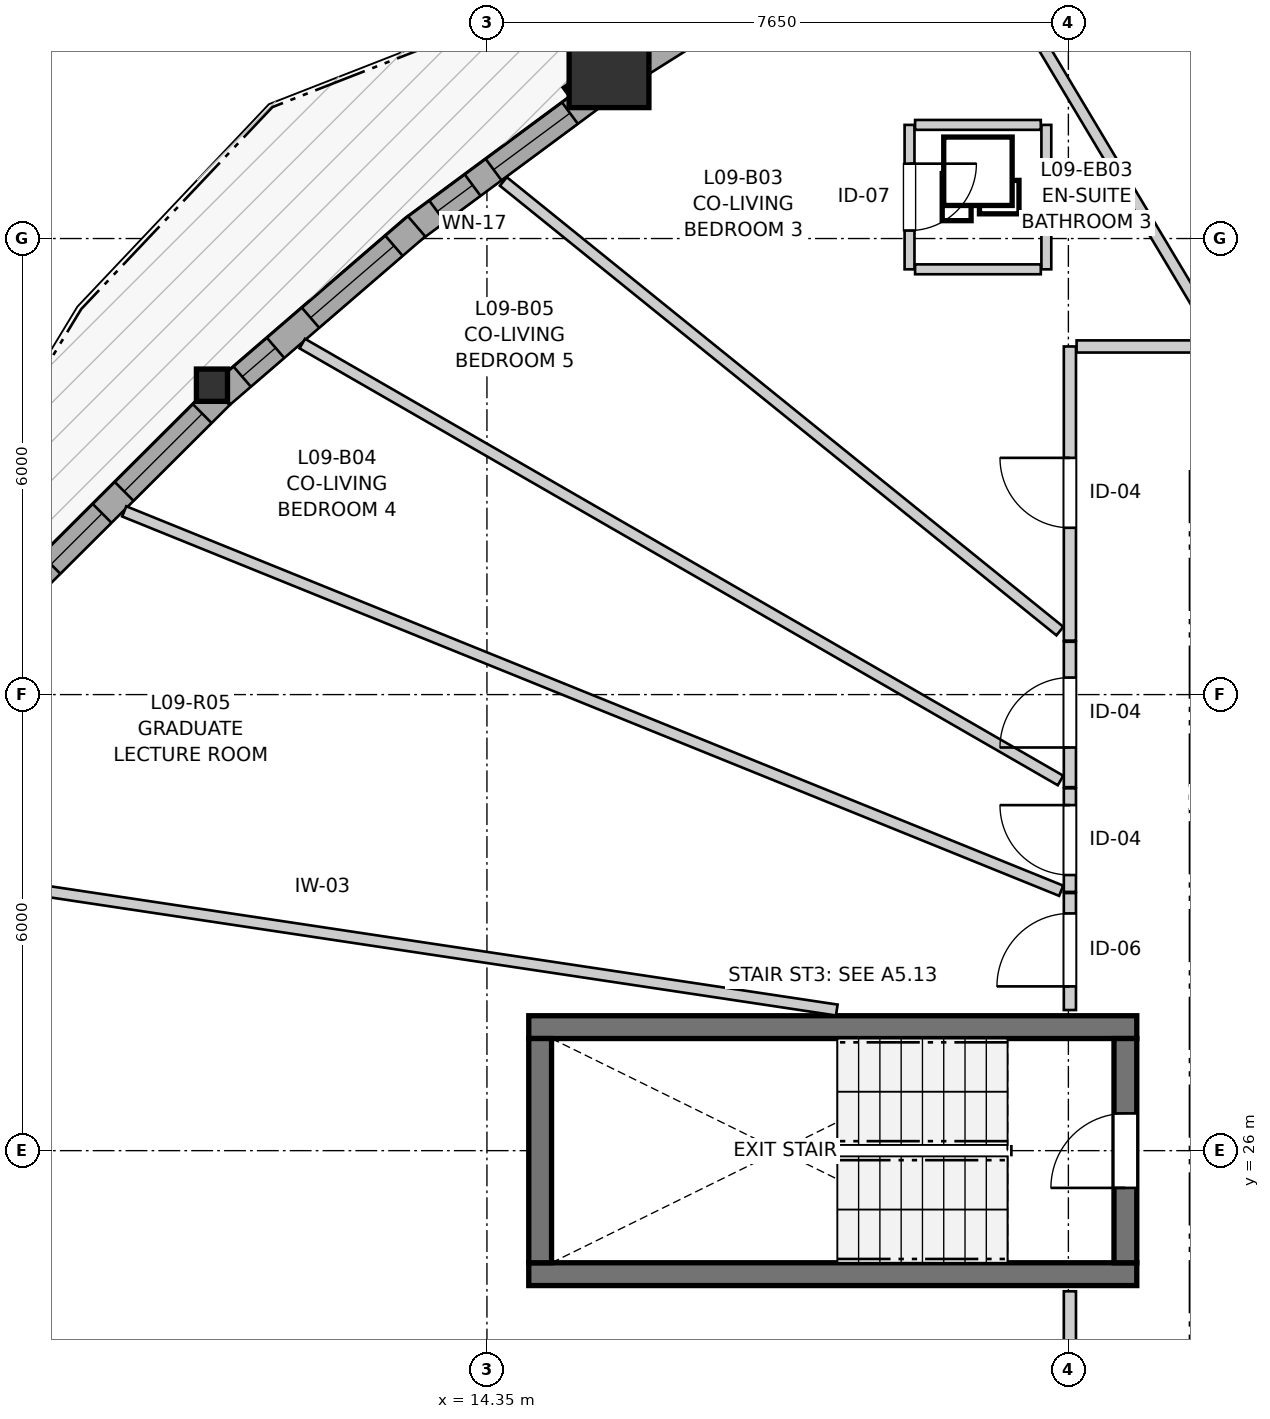
"""IFC4 building model, lengths in metres.
Left out: names, types, materials, properties, quantities, classifications, styles, units other than length and angle.
Written with IfcOpenShell. Run it as: python <this file> out.ifc"""

import sys

from ifc_helpers import new_model, si_unit, direction, frame, frame_2d, origin, origin_2d, place, context, subcontext, project, spatial, rectangle, i_section, extrude, source, transform, mapped, element, fill, save


model = new_model("IFC4")
c1 = context("Model", 3, precision=1e-05, world=origin(), true_north=direction((0.0, 1.0)))
c2 = subcontext(c1, "Body", "Model", "MODEL_VIEW")
j1 = project(units=[si_unit("LENGTHUNIT", "METRE"), si_unit("PLANEANGLEUNIT", "RADIAN")], contexts=[c1])
p1 = place(None, origin())
s1 = spatial("IfcSite", under=j1, at=p1, CompositionType="ELEMENT")
p2 = place(p1, origin())
s2 = spatial("IfcBuilding", under=s1, at=p2, CompositionType="ELEMENT")
p3 = place(p2, frame((0.0, 0.0, 33.4)))
s3 = spatial("IfcBuildingStorey", under=s2, at=p3, CompositionType="ELEMENT", Elevation=33.4)
for number, where, z_axis, x_axis in (
    (1, (14.9, 24.375, 0.0), (0.0, 0.0, 1.0), (1.0, 0.0, 0.0)),
    (2, (22.9, 27.625, 0.0), (0.0, 0.0, 1.0), (-1.0, 0.0, 0.0)),
):
    element("IfcWall", number, at=place(p3, frame(where, z_axis=z_axis, x_axis=x_axis)), inside=s3, PredefinedType="SHEAR", context=c2, shape_type="SweptSolid", body=[
        extrude(rectangle(XDim=8.0, YDim=0.3, at=frame_2d((4.0, 0.0))), origin(), (0.0, 0.0, 1.0), 2.94),
    ])
p4 = place(p3, frame((15.05, 27.475, 0.0), z_axis=(0.0, 0.0, 1.0), x_axis=(0.0, -1.0, 0.0)))
e3 = element("IfcWall", 3, at=p4, inside=s3, PredefinedType="SHEAR", context=c2, shape_type="SweptSolid", body=[
    extrude(rectangle(XDim=2.95, YDim=0.3, at=frame_2d((1.475, 0.0))), origin(), (0.0, 0.0, 1.0), 2.94),
])
p5 = place(p3, frame((22.75, 24.525, 0.0), z_axis=(0.0, 0.0, 1.0), x_axis=(0.0, 1.0, 0.0)))
e4 = element("IfcWall", 4, at=p5, inside=s3, PredefinedType="SHEAR", context=c2, shape_type="SweptSolid", body=[
    extrude(rectangle(XDim=2.95, YDim=0.3, at=frame_2d((1.475, 0.0))), origin(), (0.0, 0.0, 1.0), 2.94),
])
p6 = place(p5, frame((0.985, 0.0, 0.0)))
e5 = element("IfcOpeningElement", 5, at=p6, cuts=e4, PredefinedType="OPENING", context=c2, shape_type="SweptSolid", body=[
    extrude(rectangle(XDim=0.98, YDim=2.15, at=frame_2d((0.49, 1.075))), frame((0.0, 0.16, 0.0), z_axis=(0.0, -1.0, 0.0), x_axis=(1.0, 0.0, 0.0)), (0.0, 0.0, 1.0), 0.32),
])
m1 = source(origin(), c2, "Body", "SweptSolid", [
    extrude(rectangle(XDim=1.05, YDim=1.05, at=origin_2d()), origin(), (0.0, 0.0, 1.0), 2.94),
])
p7 = place(p3, frame((15.956, 40.247, 0.0), z_axis=(0.0, 0.0, 1.0), x_axis=(1.0, 0.0, 0.0)))
e6 = element("IfcColumn", 6, at=p7, inside=s3, PredefinedType="COLUMN", context=c2, shape_type="MappedRepresentation", body=[
    mapped(m1, transform((0.0, 0.0, 0.0), x_axis=(1.0, 0.0, 0.0), y_axis=(0.0, 1.0, 0.0), z_axis=(0.0, 0.0, 1.0), scale=1.0)),
])
m2 = source(origin(), c2, "Body", "SweptSolid", [
    extrude(i_section(OverallWidth=0.409, OverallDepth=0.425, WebThickness=0.03, FlangeThickness=0.048, FilletRadius=0.015, at=origin_2d()), origin(), (0.0, 0.0, 1.0), 2.94),
])
p8 = place(p3, frame((10.732, 36.07, 0.0), z_axis=(0.0, 0.0, 1.0), x_axis=(1.0, 0.0, 0.0)))
e7 = element("IfcColumn", 7, at=p8, inside=s3, PredefinedType="PILASTER", context=c2, shape_type="MappedRepresentation", body=[
    mapped(m2, transform((0.0, 0.0, 0.0), x_axis=(1.0, 0.0, 0.0), y_axis=(0.0, 1.0, 0.0), z_axis=(0.0, 0.0, 1.0), scale=1.0)),
])
p9 = place(p3, frame((18.882, 41.882, 0.0), z_axis=(0.0, 0.0, 1.0), x_axis=(-0.846428134238, -0.53250297048, 0.0)))
e8 = element("IfcWall", 8, at=p9, inside=s3, PredefinedType="SOLIDWALL", context=c2, shape_type="SweptSolid", body=[
    extrude(rectangle(XDim=3.047, YDim=0.35, at=frame_2d((1.523, 0.0))), origin(), (0.0, 0.0, 1.0), 2.42),
])
p10 = place(p9, frame((0.803, 0.0, 0.82)))
e9 = element("IfcOpeningElement", 9, at=p10, cuts=e8, PredefinedType="OPENING", context=c2, shape_type="SweptSolid", body=[
    extrude(rectangle(XDim=1.45, YDim=1.25, at=frame_2d((0.725, 0.625))), frame((0.0, 0.185, 0.0), z_axis=(0.0, -1.0, 0.0), x_axis=(1.0, 0.0, 0.0)), (0.0, 0.0, 1.0), 0.37),
])
p11 = place(p3, frame((15.819, 39.928, 0.0), z_axis=(0.0, 0.0, 1.0), x_axis=(-0.803825144674, -0.594865645999, 0.0)))
e10 = element("IfcWall", 10, at=p11, inside=s3, PredefinedType="SOLIDWALL", context=c2, shape_type="SweptSolid", body=[
    extrude(rectangle(XDim=3.066, YDim=0.35, at=frame_2d((1.533, 0.0))), origin(), (0.0, 0.0, 1.0), 2.42),
])
p12 = place(p11, frame((0.469, 0.0, 0.82)))
e11 = element("IfcOpeningElement", 11, at=p12, cuts=e10, PredefinedType="OPENING", context=c2, shape_type="SweptSolid", body=[
    extrude(rectangle(XDim=1.25, YDim=1.35, at=frame_2d((0.625, 0.675))), frame((0.0, 0.185, 0.0), z_axis=(0.0, -1.0, 0.0), x_axis=(1.0, 0.0, 0.0)), (0.0, 0.0, 1.0), 0.37),
])
p13 = place(p11, frame((2.062, 0.0, 0.82)))
e12 = element("IfcOpeningElement", 12, at=p13, cuts=e10, PredefinedType="OPENING", context=c2, shape_type="SweptSolid", body=[
    extrude(rectangle(XDim=0.58, YDim=1.35, at=frame_2d((0.29, 0.675))), frame((0.0, 0.185, 0.0), z_axis=(0.0, -1.0, 0.0), x_axis=(1.0, 0.0, 0.0)), (0.0, 0.0, 1.0), 0.37),
])
p14 = place(p3, frame((13.424, 38.16, 0.0), z_axis=(0.0, 0.0, 1.0), x_axis=(-0.757512075852, -0.652821150805, 0.0)))
e13 = element("IfcWall", 13, at=p14, inside=s3, PredefinedType="SOLIDWALL", context=c2, shape_type="SweptSolid", body=[
    extrude(rectangle(XDim=3.384, YDim=0.35, at=frame_2d((1.692, 0.0))), origin(), (0.0, 0.0, 1.0), 2.42),
])
p15 = place(p14, frame((0.392, 0.0, 0.82)))
e14 = element("IfcOpeningElement", 14, at=p15, cuts=e13, PredefinedType="OPENING", context=c2, shape_type="SweptSolid", body=[
    extrude(rectangle(XDim=1.45, YDim=1.25, at=frame_2d((0.725, 0.625))), frame((0.0, 0.185, 0.0), z_axis=(0.0, -1.0, 0.0), x_axis=(1.0, 0.0, 0.0)), (0.0, 0.0, 1.0), 0.37),
])
p16 = place(p14, frame((2.449, 0.0, 0.82)))
e15 = element("IfcOpeningElement", 15, at=p16, cuts=e13, PredefinedType="OPENING", context=c2, shape_type="SweptSolid", body=[
    extrude(rectangle(XDim=0.58, YDim=1.35, at=frame_2d((0.29, 0.675))), frame((0.0, 0.185, 0.0), z_axis=(0.0, -1.0, 0.0), x_axis=(1.0, 0.0, 0.0)), (0.0, 0.0, 1.0), 0.37),
])
p17 = place(p3, frame((10.841, 35.932, 0.0), z_axis=(0.0, 0.0, 1.0), x_axis=(-0.708383272101, -0.70582798174, 0.0)))
e16 = element("IfcWall", 16, at=p17, inside=s3, PredefinedType="SOLIDWALL", context=c2, shape_type="SweptSolid", body=[
    extrude(rectangle(XDim=3.439, YDim=0.35, at=frame_2d((1.72, 0.0))), origin(), (0.0, 0.0, 1.0), 2.42),
])
p18 = place(p17, frame((0.334, 0.0, 0.82)))
e17 = element("IfcOpeningElement", 17, at=p18, cuts=e16, PredefinedType="OPENING", context=c2, shape_type="SweptSolid", body=[
    extrude(rectangle(XDim=1.45, YDim=1.25, at=frame_2d((0.725, 0.625))), frame((0.0, 0.185, 0.0), z_axis=(0.0, -1.0, 0.0), x_axis=(1.0, 0.0, 0.0)), (0.0, 0.0, 1.0), 0.37),
])
p19 = place(p17, frame((2.194, 0.0, 0.82)))
e18 = element("IfcOpeningElement", 18, at=p19, cuts=e16, PredefinedType="OPENING", context=c2, shape_type="SweptSolid", body=[
    extrude(rectangle(XDim=0.95, YDim=1.35, at=frame_2d((0.475, 0.675))), frame((0.0, 0.185, 0.0), z_axis=(0.0, -1.0, 0.0), x_axis=(1.0, 0.0, 0.0)), (0.0, 0.0, 1.0), 0.37),
])
p20 = place(p3, frame((22.02, 16.883, 0.0), z_axis=(0.0, 0.0, 1.0), x_axis=(0.0, 1.0, 0.0)))
e19 = element("IfcWall", 19, at=p20, inside=s3, PredefinedType="PARTITIONING", context=c2, shape_type="SweptSolid", body=[
    extrude(rectangle(XDim=7.267, YDim=0.16, at=frame_2d((3.633, 0.0))), origin(), (0.0, 0.0, 1.0), 2.94),
])
p21 = place(p20, frame((2.845, 0.0, 0.0)))
e20 = element("IfcOpeningElement", 20, at=p21, cuts=e19, PredefinedType="OPENING", context=c2, shape_type="SweptSolid", body=[
    extrude(rectangle(XDim=1.3, YDim=2.1, at=frame_2d((0.65, 1.05))), frame((0.0, 0.09, 0.0), z_axis=(0.0, -1.0, 0.0), x_axis=(1.0, 0.0, 0.0)), (0.0, 0.0, 1.0), 0.18),
])
p22 = place(p3, frame((22.02, 32.71, 0.0), z_axis=(0.0, 0.0, 1.0), x_axis=(0.0, 1.0, 0.0)))
e21 = element("IfcWall", 21, at=p22, inside=s3, PredefinedType="PARTITIONING", context=c2, shape_type="SweptSolid", body=[
    extrude(rectangle(XDim=3.87, YDim=0.16, at=frame_2d((1.935, 0.0))), origin(), (0.0, 0.0, 1.0), 2.94),
])
p23 = place(p22, frame((1.485, 0.0, 0.0)))
e22 = element("IfcOpeningElement", 22, at=p23, cuts=e21, PredefinedType="OPENING", context=c2, shape_type="SweptSolid", body=[
    extrude(rectangle(XDim=0.92, YDim=2.1, at=frame_2d((0.46, 1.05))), frame((0.0, 0.09, 0.0), z_axis=(0.0, -1.0, 0.0), x_axis=(1.0, 0.0, 0.0)), (0.0, 0.0, 1.0), 0.18),
])
p24 = place(p3, frame((22.02, 30.782, 0.0), z_axis=(0.0, 0.0, 1.0), x_axis=(0.0, 1.0, 0.0)))
e23 = element("IfcWall", 23, at=p24, inside=s3, PredefinedType="PARTITIONING", context=c2, shape_type="SweptSolid", body=[
    extrude(rectangle(XDim=1.913, YDim=0.16, at=frame_2d((0.957, 0.0))), origin(), (0.0, 0.0, 1.0), 2.94),
])
p25 = place(p24, frame((0.522, 0.0, 0.0)))
e24 = element("IfcOpeningElement", 24, at=p25, cuts=e23, PredefinedType="OPENING", context=c2, shape_type="SweptSolid", body=[
    extrude(rectangle(XDim=0.92, YDim=2.1, at=frame_2d((0.46, 1.05))), frame((0.0, 0.09, 0.0), z_axis=(0.0, -1.0, 0.0), x_axis=(1.0, 0.0, 0.0)), (0.0, 0.0, 1.0), 0.18),
])
p26 = place(p3, frame((19.91, 39.495, 0.0), z_axis=(0.0, 0.0, 1.0), x_axis=(0.0, -1.0, 0.0)))
e25 = element("IfcWall", 25, at=p26, inside=s3, PredefinedType="PARTITIONING", context=c2, shape_type="SweptSolid", body=[
    extrude(rectangle(XDim=1.9, YDim=0.13, at=frame_2d((0.95, 0.0))), origin(), (0.0, 0.0, 1.0), 2.94),
])
p27 = place(p26, frame((0.51, 0.0, 0.0)))
e26 = element("IfcOpeningElement", 26, at=p27, cuts=e25, PredefinedType="OPENING", context=c2, shape_type="SweptSolid", body=[
    extrude(rectangle(XDim=0.88, YDim=2.05, at=frame_2d((0.44, 1.025))), frame((0.0, 0.075, 0.0), z_axis=(0.0, -1.0, 0.0), x_axis=(1.0, 0.0, 0.0)), (0.0, 0.0, 1.0), 0.15),
])
p28 = place(p3, frame((22.02, 27.85, 0.0), z_axis=(0.0, 0.0, 1.0), x_axis=(0.0, 1.0, 0.0)))
e27 = element("IfcWall", 27, at=p28, inside=s3, PredefinedType="PARTITIONING", context=c2, shape_type="SweptSolid", body=[
    extrude(rectangle(XDim=1.539, YDim=0.16, at=frame_2d((0.77, 0.0))), origin(), (0.0, 0.0, 1.0), 2.94),
])
p29 = place(p28, frame((0.311, 0.0, 0.0)))
e28 = element("IfcOpeningElement", 28, at=p29, cuts=e27, PredefinedType="OPENING", context=c2, shape_type="SweptSolid", body=[
    extrude(rectangle(XDim=0.96, YDim=2.1, at=frame_2d((0.48, 1.05))), frame((0.0, 0.09, 0.0), z_axis=(0.0, -1.0, 0.0), x_axis=(1.0, 0.0, 0.0)), (0.0, 0.0, 1.0), 0.18),
])
p30 = place(p3, frame((22.02, 29.404, 0.0), z_axis=(0.0, 0.0, 1.0), x_axis=(0.0, 1.0, 0.0)))
e29 = element("IfcWall", 29, at=p30, inside=s3, PredefinedType="PARTITIONING", context=c2, shape_type="SweptSolid", body=[
    extrude(rectangle(XDim=1.363, YDim=0.16, at=frame_2d((0.682, 0.0))), origin(), (0.0, 0.0, 1.0), 2.94),
])
p31 = place(p30, frame((0.222, 0.0, 0.0)))
e30 = element("IfcOpeningElement", 30, at=p31, cuts=e29, PredefinedType="OPENING", context=c2, shape_type="SweptSolid", body=[
    extrude(rectangle(XDim=0.92, YDim=2.1, at=frame_2d((0.46, 1.05))), frame((0.0, 0.09, 0.0), z_axis=(0.0, -1.0, 0.0), x_axis=(1.0, 0.0, 0.0)), (0.0, 0.0, 1.0), 0.18),
])
p32 = place(p3, frame((5.242, 29.91, 0.0), z_axis=(0.0, 0.0, 1.0), x_axis=(0.988899381561, -0.148586719285, 0.0)))
e31 = element("IfcWall", 31, at=p32, inside=s3, PredefinedType="PARTITIONING", context=c2, shape_type="SweptSolid", body=[
    extrude(rectangle(XDim=13.864, YDim=0.145, at=frame_2d((6.932, 0.0))), origin(), (0.0, 0.0, 1.0), 2.94),
])
p33 = place(p3, frame((9.577, 34.41, 0.0), z_axis=(0.0, 0.0, 1.0), x_axis=(0.926920362809, -0.375258099194, 0.0)))
e32 = element("IfcWall", 32, at=p33, inside=s3, PredefinedType="PARTITIONING", context=c2, shape_type="SweptSolid", body=[
    extrude(rectangle(XDim=13.3, YDim=0.145, at=frame_2d((6.65, 0.0))), origin(), (0.0, 0.0, 1.0), 2.94),
])
p34 = place(p3, frame((11.92, 36.618, 0.0), z_axis=(0.0, 0.0, 1.0), x_axis=(0.866473494239, -0.499223080177, 0.0)))
e33 = element("IfcWall", 33, at=p34, inside=s3, PredefinedType="PARTITIONING", context=c2, shape_type="SweptSolid", body=[
    extrude(rectangle(XDim=11.514, YDim=0.145, at=frame_2d((5.757, 0.0))), origin(), (0.0, 0.0, 1.0), 2.94),
])
p35 = place(p3, frame((14.566, 38.751, 0.0), z_axis=(0.0, 0.0, 1.0), x_axis=(0.777881688073, -0.628410756879, 0.0)))
e34 = element("IfcWall", 34, at=p35, inside=s3, PredefinedType="PARTITIONING", context=c2, shape_type="SweptSolid", body=[
    extrude(rectangle(XDim=9.413, YDim=0.145, at=frame_2d((4.707, 0.0))), origin(), (0.0, 0.0, 1.0), 2.94),
])
p36 = place(p3, frame((20.481, 42.51, 0.0), z_axis=(0.0, 0.0, 1.0), x_axis=(0.513067331262, -0.858348363773, 0.0)))
e35 = element("IfcWall", 35, at=p36, inside=s3, PredefinedType="PARTITIONING", context=c2, shape_type="SweptSolid", body=[
    extrude(rectangle(XDim=6.765, YDim=0.145, at=frame_2d((3.382, 0.0))), origin(), (0.0, 0.0, 1.0), 2.94),
])
p37 = place(p3, frame((22.108, 36.58, 0.0), z_axis=(0.0, 0.0, 1.0), x_axis=(1.0, 0.0, 0.0)))
e36 = element("IfcWall", 36, at=p37, inside=s3, PredefinedType="PARTITIONING", context=c2, shape_type="SweptSolid", body=[
    extrude(rectangle(XDim=1.746, YDim=0.16, at=frame_2d((0.873, 0.0))), origin(), (0.0, 0.0, 1.0), 2.548),
])
p38 = place(p3, frame((21.71, 37.595, 0.0), z_axis=(0.0, 0.0, 1.0), x_axis=(0.0, 1.0, 0.0)))
e37 = element("IfcWall", 37, at=p38, inside=s3, PredefinedType="PARTITIONING", context=c2, shape_type="SweptSolid", body=[
    extrude(rectangle(XDim=1.9, YDim=0.13, at=frame_2d((0.95, 0.0))), origin(), (0.0, 0.0, 1.0), 2.94),
])
for number, where, z_axis, x_axis in (
    (38, (19.983, 39.495, 0.0), (0.0, 0.0, 1.0), (1.0, 0.0, 0.0)),
    (39, (19.983, 37.595, 0.0), (0.0, 0.0, 1.0), (1.0, 0.0, 0.0)),
):
    element("IfcWall", number, at=place(p3, frame(where, z_axis=z_axis, x_axis=x_axis)), inside=s3, PredefinedType="PARTITIONING", context=c2, shape_type="SweptSolid", body=[
        extrude(rectangle(XDim=1.654, YDim=0.13, at=frame_2d((0.827, 0.0))), origin(), (0.0, 0.0, 1.0), 2.94),
    ])
m3 = source(origin(), c2, "Body", "SweptSolid", [
    extrude(rectangle(XDim=1.25, YDim=1.35, at=frame_2d((0.625, 0.675))), frame((0.0, 0.03, 0.0), z_axis=(0.0, -1.0, 0.0), x_axis=(1.0, 0.0, 0.0)), (0.0, 0.0, 1.0), 0.06),
])
p39 = place(p12, origin())
e40 = element("IfcWindow", 40, at=p39, inside=s3, PartitioningType="SINGLE_PANEL", PredefinedType="WINDOW", context=c2, shape_type="MappedRepresentation", body=[
    mapped(m3, transform((0.0, 0.0, 0.0), x_axis=(1.0, 0.0, 0.0), y_axis=(0.0, 1.0, 0.0), z_axis=(0.0, 0.0, 1.0), scale=1.0)),
])
fill(e11, e40)
m4 = source(origin(), c2, "Body", "SweptSolid", [
    extrude(rectangle(XDim=0.58, YDim=1.35, at=frame_2d((0.29, 0.675))), frame((0.0, 0.03, 0.0), z_axis=(0.0, -1.0, 0.0), x_axis=(1.0, 0.0, 0.0)), (0.0, 0.0, 1.0), 0.06),
])
p40 = place(p13, origin())
e41 = element("IfcWindow", 41, at=p40, inside=s3, PartitioningType="SINGLE_PANEL", PredefinedType="WINDOW", context=c2, shape_type="MappedRepresentation", body=[
    mapped(m4, transform((0.0, 0.0, 0.0), x_axis=(1.0, 0.0, 0.0), y_axis=(0.0, 1.0, 0.0), z_axis=(0.0, 0.0, 1.0), scale=1.0)),
])
fill(e12, e41)
m5 = source(origin(), c2, "Body", "SweptSolid", [
    extrude(rectangle(XDim=1.45, YDim=1.25, at=frame_2d((0.725, 0.625))), frame((0.0, 0.03, 0.0), z_axis=(0.0, -1.0, 0.0), x_axis=(1.0, 0.0, 0.0)), (0.0, 0.0, 1.0), 0.06),
])
p41 = place(p15, origin())
e42 = element("IfcWindow", 42, at=p41, inside=s3, PartitioningType="SINGLE_PANEL", PredefinedType="WINDOW", context=c2, shape_type="MappedRepresentation", body=[
    mapped(m5, transform((0.0, 0.0, 0.0), x_axis=(1.0, 0.0, 0.0), y_axis=(0.0, 1.0, 0.0), z_axis=(0.0, 0.0, 1.0), scale=1.0)),
])
fill(e14, e42)
p42 = place(p16, origin())
e43 = element("IfcWindow", 43, at=p42, inside=s3, PartitioningType="SINGLE_PANEL", PredefinedType="WINDOW", context=c2, shape_type="MappedRepresentation", body=[
    mapped(m4, transform((0.0, 0.0, 0.0), x_axis=(1.0, 0.0, 0.0), y_axis=(0.0, 1.0, 0.0), z_axis=(0.0, 0.0, 1.0), scale=1.0)),
])
fill(e15, e43)
p43 = place(p18, origin())
e44 = element("IfcWindow", 44, at=p43, inside=s3, PartitioningType="SINGLE_PANEL", PredefinedType="WINDOW", context=c2, shape_type="MappedRepresentation", body=[
    mapped(m5, transform((0.0, 0.0, 0.0), x_axis=(1.0, 0.0, 0.0), y_axis=(0.0, 1.0, 0.0), z_axis=(0.0, 0.0, 1.0), scale=1.0)),
])
fill(e17, e44)
m6 = source(origin(), c2, "Body", "SweptSolid", [
    extrude(rectangle(XDim=0.95, YDim=1.35, at=frame_2d((0.475, 0.675))), frame((0.0, 0.03, 0.0), z_axis=(0.0, -1.0, 0.0), x_axis=(1.0, 0.0, 0.0)), (0.0, 0.0, 1.0), 0.06),
])
p44 = place(p19, origin())
e45 = element("IfcWindow", 45, at=p44, inside=s3, PartitioningType="SINGLE_PANEL", PredefinedType="WINDOW", context=c2, shape_type="MappedRepresentation", body=[
    mapped(m6, transform((0.0, 0.0, 0.0), x_axis=(1.0, 0.0, 0.0), y_axis=(0.0, 1.0, 0.0), z_axis=(0.0, 0.0, 1.0), scale=1.0)),
])
fill(e18, e45)
m7 = source(origin(), c2, "Body", "SweptSolid", [
    extrude(rectangle(XDim=0.98, YDim=2.15, at=frame_2d((0.49, 1.075))), frame((0.0, 0.025, 0.0), z_axis=(0.0, -1.0, 0.0), x_axis=(1.0, 0.0, 0.0)), (0.0, 0.0, 1.0), 0.05),
])
p45 = place(p6, origin())
e46 = element("IfcDoor", 46, at=p45, inside=s3, OperationType="SINGLE_SWING_LEFT", PredefinedType="DOOR", context=c2, shape_type="MappedRepresentation", body=[
    mapped(m7, transform((0.0, 0.0, 0.0), x_axis=(1.0, 0.0, 0.0), y_axis=(0.0, 1.0, 0.0), z_axis=(0.0, 0.0, 1.0), scale=1.0)),
])
fill(e5, e46)
m8 = source(origin(), c2, "Body", "SweptSolid", [
    extrude(rectangle(XDim=0.92, YDim=2.1, at=frame_2d((0.46, 1.05))), frame((0.0, 0.025, 0.0), z_axis=(0.0, -1.0, 0.0), x_axis=(1.0, 0.0, 0.0)), (0.0, 0.0, 1.0), 0.05),
])
p46 = place(p23, origin())
e47 = element("IfcDoor", 47, at=p46, inside=s3, OperationType="SINGLE_SWING_RIGHT", PredefinedType="DOOR", context=c2, shape_type="MappedRepresentation", body=[
    mapped(m8, transform((0.0, 0.0, 0.0), x_axis=(1.0, 0.0, 0.0), y_axis=(0.0, 1.0, 0.0), z_axis=(0.0, 0.0, 1.0), scale=1.0)),
])
fill(e22, e47)
p47 = place(p25, origin())
e48 = element("IfcDoor", 48, at=p47, inside=s3, OperationType="SINGLE_SWING_LEFT", PredefinedType="DOOR", context=c2, shape_type="MappedRepresentation", body=[
    mapped(m8, transform((0.0, 0.0, 0.0), x_axis=(1.0, 0.0, 0.0), y_axis=(0.0, 1.0, 0.0), z_axis=(0.0, 0.0, 1.0), scale=1.0)),
])
fill(e24, e48)
m9 = source(origin(), c2, "Body", "SweptSolid", [
    extrude(rectangle(XDim=0.88, YDim=2.05, at=frame_2d((0.44, 1.025))), frame((0.0, 0.025, 0.0), z_axis=(0.0, -1.0, 0.0), x_axis=(1.0, 0.0, 0.0)), (0.0, 0.0, 1.0), 0.05),
])
p48 = place(p27, origin())
e49 = element("IfcDoor", 49, at=p48, inside=s3, OperationType="SINGLE_SWING_LEFT", PredefinedType="DOOR", context=c2, shape_type="MappedRepresentation", body=[
    mapped(m9, transform((0.0, 0.0, 0.0), x_axis=(1.0, 0.0, 0.0), y_axis=(0.0, 1.0, 0.0), z_axis=(0.0, 0.0, 1.0), scale=1.0)),
])
fill(e26, e49)
m10 = source(origin(), c2, "Body", "SweptSolid", [
    extrude(rectangle(XDim=0.96, YDim=2.1, at=frame_2d((0.48, 1.05))), frame((0.0, 0.025, 0.0), z_axis=(0.0, -1.0, 0.0), x_axis=(1.0, 0.0, 0.0)), (0.0, 0.0, 1.0), 0.05),
])
p49 = place(p29, origin())
e50 = element("IfcDoor", 50, at=p49, inside=s3, OperationType="SINGLE_SWING_LEFT", PredefinedType="DOOR", context=c2, shape_type="MappedRepresentation", body=[
    mapped(m10, transform((0.0, 0.0, 0.0), x_axis=(1.0, 0.0, 0.0), y_axis=(0.0, 1.0, 0.0), z_axis=(0.0, 0.0, 1.0), scale=1.0)),
])
fill(e28, e50)
p50 = place(p31, origin())
e51 = element("IfcDoor", 51, at=p50, inside=s3, OperationType="SINGLE_SWING_RIGHT", PredefinedType="DOOR", context=c2, shape_type="MappedRepresentation", body=[
    mapped(m8, transform((0.0, 0.0, 0.0), x_axis=(1.0, 0.0, 0.0), y_axis=(0.0, 1.0, 0.0), z_axis=(0.0, 0.0, 1.0), scale=1.0)),
])
fill(e30, e51)
save(model, sys.argv[1])
